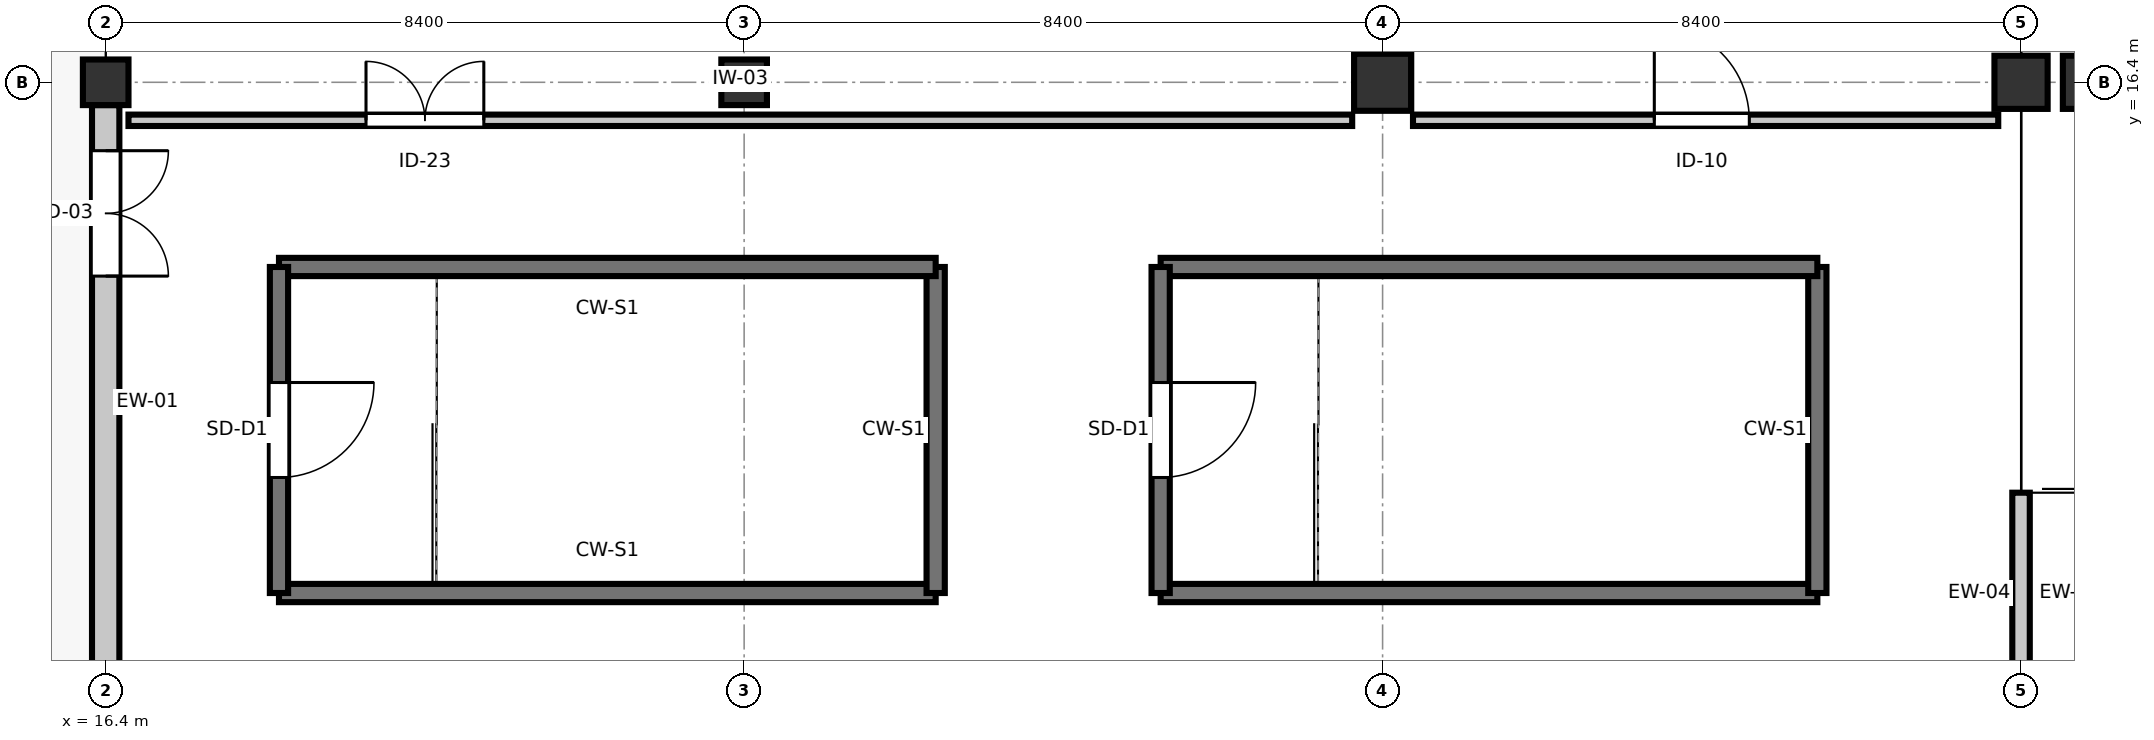
"""IFC4 building model, lengths in metres.
Left out: names, types, materials, properties, quantities, classifications, styles, units other than length and angle.
Written with IfcOpenShell. Run it as: python <this file> out.ifc"""

import sys

from ifc_helpers import new_model, si_unit, direction, frame, frame_2d, origin, origin_2d, place, context, subcontext, project, spatial, rectangle, circle, extrude, element, fill, save


model = new_model("IFC4")
c1 = context("Model", 3, precision=1e-05, world=origin(), true_north=direction((0.0, 1.0)))
c2 = subcontext(c1, "Body", "Model", "MODEL_VIEW")
j1 = project(units=[si_unit("LENGTHUNIT", "METRE"), si_unit("PLANEANGLEUNIT", "RADIAN")], contexts=[c1])
p1 = place(None, origin())
s1 = spatial("IfcSite", under=j1, at=p1, CompositionType="ELEMENT")
p2 = place(p1, origin())
s2 = spatial("IfcBuilding", under=s1, at=p2, CompositionType="ELEMENT")
p3 = place(p2, frame((0.0, 0.0, 4.8)))
s3 = spatial("IfcBuildingStorey", under=s2, at=p3, CompositionType="ELEMENT", Elevation=4.8)
p4 = place(p3, frame((16.4, 16.4, 0.0), z_axis=(0.0, 0.0, 1.0), x_axis=(1.0, 0.0, 0.0)))
e1 = element("IfcColumn", 1, at=p4, inside=s3, PredefinedType="COLUMN", context=c2, shape_type="SweptSolid", body=[
    extrude(rectangle(XDim=0.6, YDim=0.6, at=origin_2d()), origin(), (0.0, 0.0, 1.0), 4.8),
])
p5 = place(p3, frame((24.8, 16.4, 0.0), z_axis=(0.0, 0.0, 1.0), x_axis=(1.0, 0.0, 0.0)))
e2 = element("IfcColumn", 2, at=p5, inside=s3, PredefinedType="COLUMN", context=c2, shape_type="SweptSolid", body=[
    extrude(circle(Radius=0.375, at=origin_2d()), origin(), (0.0, 0.0, 1.0), 4.8),
])
p6 = place(p3, frame((33.2, 16.4, 0.0), z_axis=(0.0, 0.0, 1.0), x_axis=(1.0, 0.0, 0.0)))
e3 = element("IfcColumn", 3, at=p6, inside=s3, PredefinedType="COLUMN", context=c2, shape_type="SweptSolid", body=[
    extrude(rectangle(XDim=0.75, YDim=0.75, at=origin_2d()), origin(), (0.0, 0.0, 1.0), 4.8),
])
for number, where, z_axis, x_axis in (
    (4, (41.6, 16.4, 0.0), (0.0, 0.0, 1.0), (1.0, 0.0, 0.0)),
    (5, (42.5, 16.4, 0.0), (0.0, 0.0, 1.0), (1.0, 0.0, 0.0)),
):
    element("IfcColumn", number, at=place(p3, frame(where, z_axis=z_axis, x_axis=x_axis)), inside=s3, PredefinedType="COLUMN", context=c2, shape_type="SweptSolid", body=[
        extrude(rectangle(XDim=0.7, YDim=0.7, at=origin_2d()), origin(), (0.0, 0.0, 1.0), 4.8),
    ])
p7 = place(p3, frame((41.6, 8.35, 0.0), z_axis=(0.0, 0.0, 1.0), x_axis=(0.0, 1.0, 0.0)))
e6 = element("IfcWall", 6, at=p7, inside=s3, PredefinedType="STANDARD", context=c2, shape_type="SweptSolid", body=[
    extrude(rectangle(XDim=2.65, YDim=0.23, at=frame_2d((1.325, 0.0))), origin(), (0.0, 0.0, 1.0), 3.745),
])
p8 = place(p3, frame((16.4, 16.1, 0.0), z_axis=(0.0, 0.0, 1.0), x_axis=(0.0, -1.0, 0.0)))
e7 = element("IfcWall", 7, at=p8, inside=s3, PredefinedType="STANDARD", context=c2, shape_type="SweptSolid", body=[
    extrude(rectangle(XDim=7.8, YDim=0.36, at=frame_2d((3.9, 0.0))), origin(), (0.0, 0.0, 1.0), 3.745),
])
p9 = place(p8, frame((0.6, 0.0, 0.0)))
e8 = element("IfcOpeningElement", 8, at=p9, cuts=e7, PredefinedType="OPENING", context=c2, shape_type="SweptSolid", body=[
    extrude(rectangle(XDim=1.65, YDim=2.25, at=frame_2d((0.825, 1.125))), frame((0.0, 0.19, 0.0), z_axis=(0.0, -1.0, 0.0), x_axis=(1.0, 0.0, 0.0)), (0.0, 0.0, 1.0), 0.38),
])
p10 = place(p3, frame((18.68, 9.68, 0.0), z_axis=(0.0, 0.0, 1.0), x_axis=(1.0, 0.0, 0.0)))
e9 = element("IfcWall", 9, at=p10, inside=s3, PredefinedType="SHEAR", context=c2, shape_type="SweptSolid", body=[
    extrude(rectangle(XDim=8.64, YDim=0.24, at=frame_2d((4.32, 0.0))), origin(), (0.0, 0.0, 1.0), 4.55),
])
p11 = place(p3, frame((27.32, 9.68, 0.0), z_axis=(0.0, 0.0, 1.0), x_axis=(0.0, 1.0, 0.0)))
e10 = element("IfcWall", 10, at=p11, inside=s3, PredefinedType="SHEAR", context=c2, shape_type="SweptSolid", body=[
    extrude(rectangle(XDim=4.29, YDim=0.24, at=frame_2d((2.145, 0.0))), origin(), (0.0, 0.0, 1.0), 4.55),
])
p12 = place(p3, frame((27.32, 13.97, 0.0), z_axis=(0.0, 0.0, 1.0), x_axis=(-1.0, 0.0, 0.0)))
e11 = element("IfcWall", 11, at=p12, inside=s3, PredefinedType="SHEAR", context=c2, shape_type="SweptSolid", body=[
    extrude(rectangle(XDim=8.64, YDim=0.24, at=frame_2d((4.32, 0.0))), origin(), (0.0, 0.0, 1.0), 4.55),
])
p13 = place(p3, frame((18.68, 13.97, 0.0), z_axis=(0.0, 0.0, 1.0), x_axis=(0.0, -1.0, 0.0)))
e12 = element("IfcWall", 12, at=p13, inside=s3, PredefinedType="SHEAR", context=c2, shape_type="SweptSolid", body=[
    extrude(rectangle(XDim=4.29, YDim=0.24, at=frame_2d((2.145, 0.0))), origin(), (0.0, 0.0, 1.0), 4.55),
])
p14 = place(p13, frame((1.52, 0.0, 0.0)))
e13 = element("IfcOpeningElement", 13, at=p14, cuts=e12, PredefinedType="OPENING", context=c2, shape_type="SweptSolid", body=[
    extrude(rectangle(XDim=1.25, YDim=2.2, at=frame_2d((0.625, 1.1))), frame((0.0, 0.13, 0.0), z_axis=(0.0, -1.0, 0.0), x_axis=(1.0, 0.0, 0.0)), (0.0, 0.0, 1.0), 0.26),
])
p15 = place(p3, frame((30.28, 9.68, 0.0), z_axis=(0.0, 0.0, 1.0), x_axis=(1.0, 0.0, 0.0)))
e14 = element("IfcWall", 14, at=p15, inside=s3, PredefinedType="SHEAR", context=c2, shape_type="SweptSolid", body=[
    extrude(rectangle(XDim=8.64, YDim=0.24, at=frame_2d((4.32, 0.0))), origin(), (0.0, 0.0, 1.0), 4.55),
])
p16 = place(p3, frame((38.92, 9.68, 0.0), z_axis=(0.0, 0.0, 1.0), x_axis=(0.0, 1.0, 0.0)))
e15 = element("IfcWall", 15, at=p16, inside=s3, PredefinedType="SHEAR", context=c2, shape_type="SweptSolid", body=[
    extrude(rectangle(XDim=4.29, YDim=0.24, at=frame_2d((2.145, 0.0))), origin(), (0.0, 0.0, 1.0), 4.55),
])
p17 = place(p3, frame((38.92, 13.97, 0.0), z_axis=(0.0, 0.0, 1.0), x_axis=(-1.0, 0.0, 0.0)))
e16 = element("IfcWall", 16, at=p17, inside=s3, PredefinedType="SHEAR", context=c2, shape_type="SweptSolid", body=[
    extrude(rectangle(XDim=8.64, YDim=0.24, at=frame_2d((4.32, 0.0))), origin(), (0.0, 0.0, 1.0), 4.55),
])
p18 = place(p3, frame((30.28, 13.97, 0.0), z_axis=(0.0, 0.0, 1.0), x_axis=(0.0, -1.0, 0.0)))
e17 = element("IfcWall", 17, at=p18, inside=s3, PredefinedType="SHEAR", context=c2, shape_type="SweptSolid", body=[
    extrude(rectangle(XDim=4.29, YDim=0.24, at=frame_2d((2.145, 0.0))), origin(), (0.0, 0.0, 1.0), 4.55),
])
p19 = place(p18, frame((1.52, 0.0, 0.0)))
e18 = element("IfcOpeningElement", 18, at=p19, cuts=e17, PredefinedType="OPENING", context=c2, shape_type="SweptSolid", body=[
    extrude(rectangle(XDim=1.25, YDim=2.2, at=frame_2d((0.625, 1.1))), frame((0.0, 0.13, 0.0), z_axis=(0.0, -1.0, 0.0), x_axis=(1.0, 0.0, 0.0)), (0.0, 0.0, 1.0), 0.26),
])
p20 = place(p3, frame((16.7, 15.9, 0.0), z_axis=(0.0, 0.0, 1.0), x_axis=(1.0, 0.0, 0.0)))
e19 = element("IfcWall", 19, at=p20, inside=s3, PredefinedType="PARTITIONING", context=c2, shape_type="SweptSolid", body=[
    extrude(rectangle(XDim=16.1, YDim=0.15, at=frame_2d((8.05, 0.0))), origin(), (0.0, 0.0, 1.0), 4.535),
])
p21 = place(p20, frame((3.125, 0.0, 0.0)))
e20 = element("IfcOpeningElement", 20, at=p21, cuts=e19, PredefinedType="OPENING", context=c2, shape_type="SweptSolid", body=[
    extrude(rectangle(XDim=1.55, YDim=2.26, at=frame_2d((0.775, 1.13))), frame((0.0, 0.085, 0.0), z_axis=(0.0, -1.0, 0.0), x_axis=(1.0, 0.0, 0.0)), (0.0, 0.0, 1.0), 0.17),
])
p22 = place(p3, frame((33.6, 15.9, 0.0), z_axis=(0.0, 0.0, 1.0), x_axis=(1.0, 0.0, 0.0)))
e21 = element("IfcWall", 21, at=p22, inside=s3, PredefinedType="PARTITIONING", context=c2, shape_type="SweptSolid", body=[
    extrude(rectangle(XDim=7.7, YDim=0.15, at=frame_2d((3.85, 0.0))), origin(), (0.0, 0.0, 1.0), 4.535),
])
p23 = place(p22, frame((3.175, 0.0, 0.0)))
e22 = element("IfcOpeningElement", 22, at=p23, cuts=e21, PredefinedType="OPENING", context=c2, shape_type="SweptSolid", body=[
    extrude(rectangle(XDim=1.25, YDim=2.16, at=frame_2d((0.625, 1.08))), frame((0.0, 0.085, 0.0), z_axis=(0.0, -1.0, 0.0), x_axis=(1.0, 0.0, 0.0)), (0.0, 0.0, 1.0), 0.17),
])
p24 = place(p3, frame((33.5, 16.05, 0.0), z_axis=(0.0, 0.0, 1.0), x_axis=(0.0, 1.0, 0.0)))
e23 = element("IfcWall", 23, at=p24, inside=s3, PredefinedType="PARTITIONING", context=c2, shape_type="SweptSolid", body=[
    extrude(rectangle(XDim=3.45, YDim=0.15, at=frame_2d((1.725, 0.0))), origin(), (0.0, 0.0, 1.0), 3.645),
])
p25 = place(p9, origin())
e24 = element("IfcDoor", 24, at=p25, inside=s3, OperationType="DOUBLE_DOOR_SINGLE_SWING", PredefinedType="DOOR", context=c2, shape_type="SweptSolid", body=[
    extrude(rectangle(XDim=1.65, YDim=2.25, at=frame_2d((0.825, 1.125))), frame((0.0, 0.025, 0.0), z_axis=(0.0, -1.0, 0.0), x_axis=(1.0, 0.0, 0.0)), (0.0, 0.0, 1.0), 0.05),
])
fill(e8, e24)
p26 = place(p14, origin())
e25 = element("IfcDoor", 25, at=p26, inside=s3, OperationType="SINGLE_SWING_LEFT", PredefinedType="DOOR", context=c2, shape_type="SweptSolid", body=[
    extrude(rectangle(XDim=1.25, YDim=2.2, at=frame_2d((0.625, 1.1))), frame((0.0, 0.025, 0.0), z_axis=(0.0, -1.0, 0.0), x_axis=(1.0, 0.0, 0.0)), (0.0, 0.0, 1.0), 0.05),
])
fill(e13, e25)
p27 = place(p19, origin())
e26 = element("IfcDoor", 26, at=p27, inside=s3, OperationType="SINGLE_SWING_LEFT", PredefinedType="DOOR", context=c2, shape_type="SweptSolid", body=[
    extrude(rectangle(XDim=1.25, YDim=2.2, at=frame_2d((0.625, 1.1))), frame((0.0, 0.025, 0.0), z_axis=(0.0, -1.0, 0.0), x_axis=(1.0, 0.0, 0.0)), (0.0, 0.0, 1.0), 0.05),
])
fill(e18, e26)
p28 = place(p21, origin())
e27 = element("IfcDoor", 27, at=p28, inside=s3, OperationType="DOUBLE_DOOR_SINGLE_SWING", PredefinedType="DOOR", context=c2, shape_type="SweptSolid", body=[
    extrude(rectangle(XDim=1.55, YDim=2.26, at=frame_2d((0.775, 1.13))), frame((0.0, 0.025, 0.0), z_axis=(0.0, -1.0, 0.0), x_axis=(1.0, 0.0, 0.0)), (0.0, 0.0, 1.0), 0.05),
])
fill(e20, e27)
p29 = place(p23, origin())
e28 = element("IfcDoor", 28, at=p29, inside=s3, OperationType="SINGLE_SWING_LEFT", PredefinedType="DOOR", context=c2, shape_type="SweptSolid", body=[
    extrude(rectangle(XDim=1.25, YDim=2.16, at=frame_2d((0.625, 1.08))), frame((0.0, 0.025, 0.0), z_axis=(0.0, -1.0, 0.0), x_axis=(1.0, 0.0, 0.0)), (0.0, 0.0, 1.0), 0.05),
])
fill(e22, e28)
save(model, sys.argv[1])
